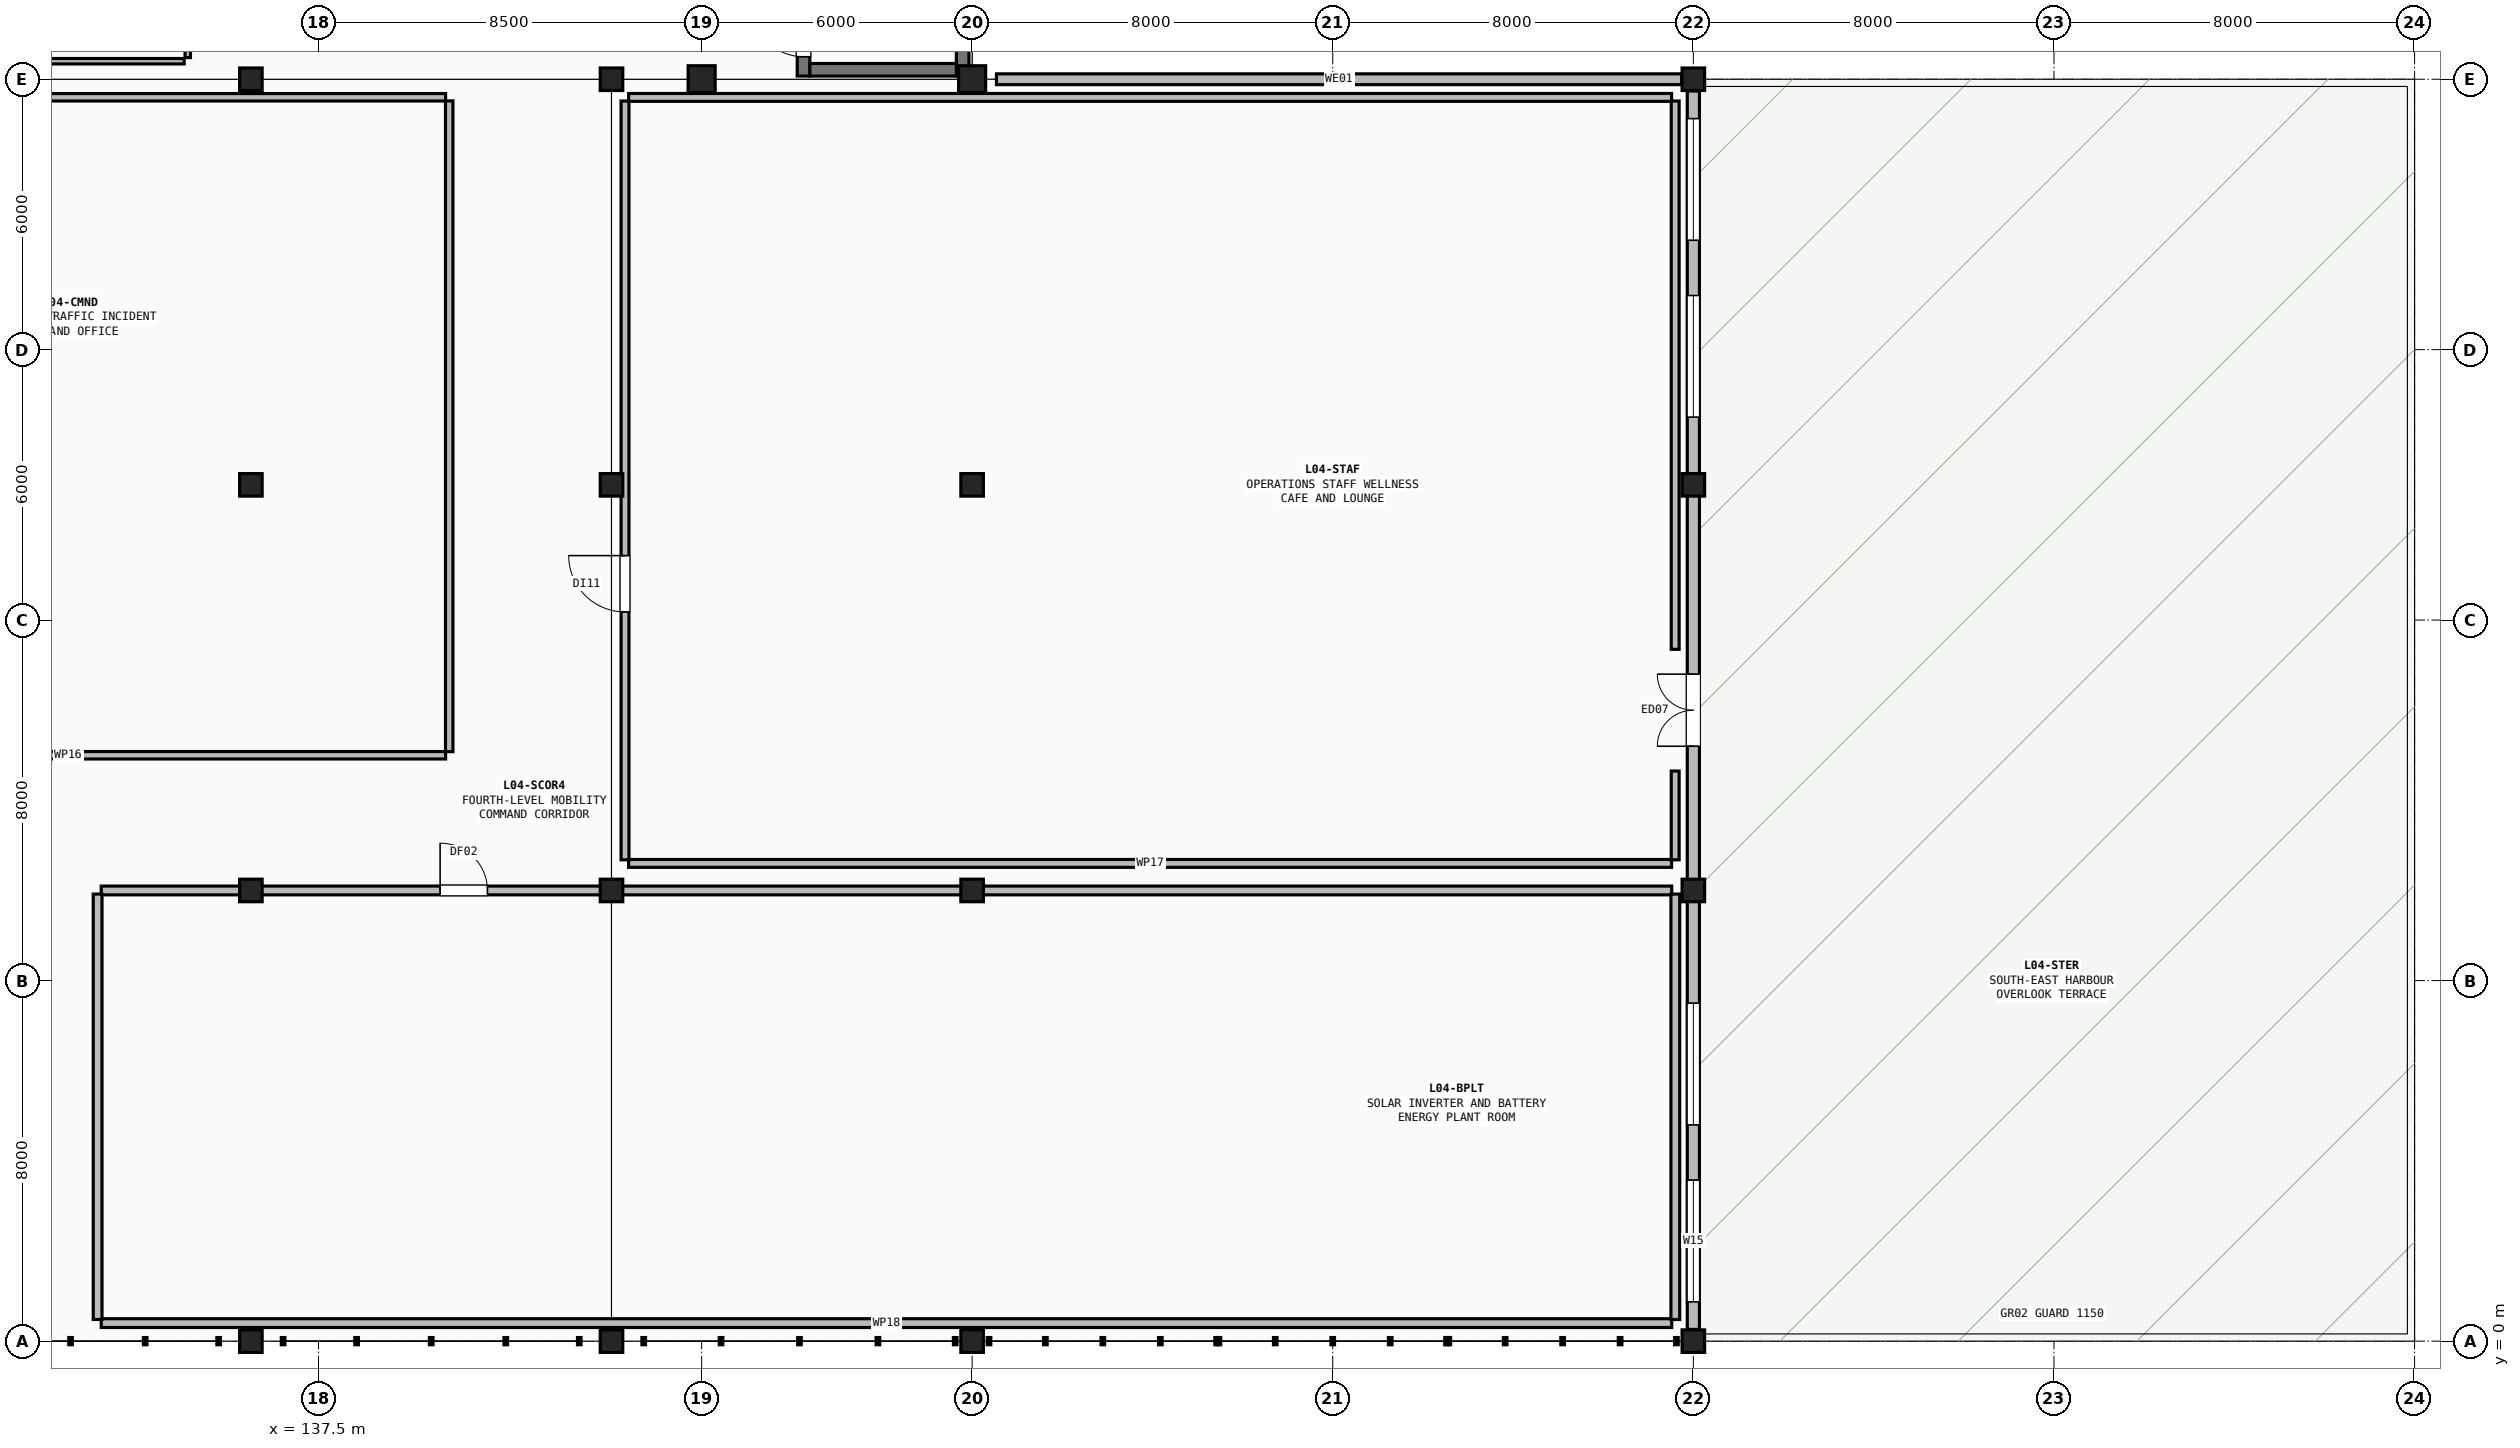
"""IFC4 building model, lengths in metres.
Left out: names, types, materials, properties, quantities, classifications, styles, units other than length and angle.
Written with IfcOpenShell. Run it as: python <this file> out.ifc"""

import sys

from ifc_helpers import new_model, si_unit, direction, frame, frame_2d, origin, origin_2d, place, context, subcontext, project, spatial, rectangle, extrude, element, fill, save


model = new_model("IFC4")
c1 = context("Model", 3, precision=1e-05, world=origin(), true_north=direction((0.0, 1.0)))
c2 = subcontext(c1, "Body", "Model", "MODEL_VIEW")
j1 = project(units=[si_unit("LENGTHUNIT", "METRE"), si_unit("PLANEANGLEUNIT", "RADIAN")], contexts=[c1])
p1 = place(None, origin())
s1 = spatial("IfcSite", under=j1, at=p1, CompositionType="ELEMENT")
p2 = place(p1, origin())
s2 = spatial("IfcBuilding", under=s1, at=p2, CompositionType="ELEMENT")
p3 = place(p2, frame((0.0, 0.0, 15.6)))
s3 = spatial("IfcBuildingStorey", under=s2, at=p3, CompositionType="ELEMENT", Elevation=15.6)
for number, where, z_axis, x_axis in (
    (1, (146.0, 28.0, 0.0), (0.0, 0.0, 1.0), (1.0, 0.0, 0.0)),
    (2, (152.0, 28.0, 0.0), (0.0, 0.0, 1.0), (1.0, 0.0, 0.0)),
):
    element("IfcColumn", number, at=place(p3, frame(where, z_axis=z_axis, x_axis=x_axis)), inside=s3, PredefinedType="COLUMN", context=c2, shape_type="SweptSolid", body=[
        extrude(rectangle(XDim=0.6, YDim=0.6, at=origin_2d()), origin(), (0.0, 0.0, 1.0), 3.6),
    ])
for number, where, z_axis, x_axis in (
    (3, (136.0, 0.0, 0.0), (0.0, 0.0, 1.0), (1.0, 0.0, 0.0)),
    (4, (136.0, 10.0, 0.0), (0.0, 0.0, 1.0), (1.0, 0.0, 0.0)),
    (5, (136.0, 19.0, 0.0), (0.0, 0.0, 1.0), (1.0, 0.0, 0.0)),
    (6, (136.0, 28.0, 0.0), (0.0, 0.0, 1.0), (1.0, 0.0, 0.0)),
    (7, (144.0, 0.0, 0.0), (0.0, 0.0, 1.0), (1.0, 0.0, 0.0)),
    (8, (144.0, 10.0, 0.0), (0.0, 0.0, 1.0), (1.0, 0.0, 0.0)),
    (9, (144.0, 19.0, 0.0), (0.0, 0.0, 1.0), (1.0, 0.0, 0.0)),
    (10, (144.0, 28.0, 0.0), (0.0, 0.0, 1.0), (1.0, 0.0, 0.0)),
    (11, (152.0, 0.0, 0.0), (0.0, 0.0, 1.0), (1.0, 0.0, 0.0)),
    (12, (152.0, 10.0, 0.0), (0.0, 0.0, 1.0), (1.0, 0.0, 0.0)),
    (13, (152.0, 19.0, 0.0), (0.0, 0.0, 1.0), (1.0, 0.0, 0.0)),
    (14, (168.0, 0.0, 0.0), (0.0, 0.0, 1.0), (1.0, 0.0, 0.0)),
    (15, (168.0, 10.0, 0.0), (0.0, 0.0, 1.0), (1.0, 0.0, 0.0)),
    (16, (168.0, 19.0, 0.0), (0.0, 0.0, 1.0), (1.0, 0.0, 0.0)),
    (17, (168.0, 28.0, 0.0), (0.0, 0.0, 1.0), (1.0, 0.0, 0.0)),
):
    element("IfcColumn", number, at=place(p3, frame(where, z_axis=z_axis, x_axis=x_axis)), inside=s3, PredefinedType="COLUMN", context=c2, shape_type="SweptSolid", body=[
        extrude(rectangle(XDim=0.5, YDim=0.5, at=origin_2d()), origin(), (0.0, 0.0, 1.0), 3.6),
    ])
p4 = place(p3, frame((168.0, 0.26, 0.0), z_axis=(0.0, 0.0, 1.0), x_axis=(0.0, 1.0, 0.0)))
e18 = element("IfcWall", 18, at=p4, inside=s3, PredefinedType="SOLIDWALL", context=c2, shape_type="SweptSolid", body=[
    extrude(rectangle(XDim=27.48, YDim=0.27, at=frame_2d((13.74, 0.0))), origin(), (0.0, 0.0, 1.0), 2.495),
])
p5 = place(p4, frame((12.94, 0.0, 0.0)))
e19 = element("IfcOpeningElement", 19, at=p5, cuts=e18, PredefinedType="OPENING", context=c2, shape_type="SweptSolid", body=[
    extrude(rectangle(XDim=1.6, YDim=2.1, at=frame_2d((0.8, 1.05))), frame((0.0, 0.145, 0.0), z_axis=(0.0, -1.0, 0.0), x_axis=(1.0, 0.0, 0.0)), (0.0, 0.0, 1.0), 0.29),
])
p6 = place(p4, frame((0.613, 0.0, 0.495)))
e20 = element("IfcOpeningElement", 20, at=p6, cuts=e18, PredefinedType="OPENING", context=c2, shape_type="SweptSolid", body=[
    extrude(rectangle(XDim=2.7, YDim=1.8, at=frame_2d((1.35, 0.9))), frame((0.0, 0.145, 0.0), z_axis=(0.0, -1.0, 0.0), x_axis=(1.0, 0.0, 0.0)), (0.0, 0.0, 1.0), 0.29),
])
p7 = place(p4, frame((4.539, 0.0, 0.495)))
e21 = element("IfcOpeningElement", 21, at=p7, cuts=e18, PredefinedType="OPENING", context=c2, shape_type="SweptSolid", body=[
    extrude(rectangle(XDim=2.7, YDim=1.8, at=frame_2d((1.35, 0.9))), frame((0.0, 0.145, 0.0), z_axis=(0.0, -1.0, 0.0), x_axis=(1.0, 0.0, 0.0)), (0.0, 0.0, 1.0), 0.29),
])
p8 = place(p4, frame((20.241, 0.0, 0.495)))
e22 = element("IfcOpeningElement", 22, at=p8, cuts=e18, PredefinedType="OPENING", context=c2, shape_type="SweptSolid", body=[
    extrude(rectangle(XDim=2.7, YDim=1.8, at=frame_2d((1.35, 0.9))), frame((0.0, 0.145, 0.0), z_axis=(0.0, -1.0, 0.0), x_axis=(1.0, 0.0, 0.0)), (0.0, 0.0, 1.0), 0.29),
])
p9 = place(p4, frame((24.167, 0.0, 0.495)))
e23 = element("IfcOpeningElement", 23, at=p9, cuts=e18, PredefinedType="OPENING", context=c2, shape_type="SweptSolid", body=[
    extrude(rectangle(XDim=2.7, YDim=1.8, at=frame_2d((1.35, 0.9))), frame((0.0, 0.145, 0.0), z_axis=(0.0, -1.0, 0.0), x_axis=(1.0, 0.0, 0.0)), (0.0, 0.0, 1.0), 0.29),
])
p10 = place(p3, frame((167.74, 28.0, 1.2), z_axis=(0.0, 0.0, 1.0), x_axis=(-1.0, 0.0, 0.0)))
e24 = element("IfcWall", 24, at=p10, inside=s3, PredefinedType="SOLIDWALL", context=c2, shape_type="SweptSolid", body=[
    extrude(rectangle(XDim=15.2, YDim=0.24, at=frame_2d((7.6, 0.0))), origin(), (0.0, 0.0, 1.0), 1.295),
])
p11 = place(p3, frame((148.26, 28.07, 0.0), z_axis=(0.0, 0.0, 1.0), x_axis=(0.0, 1.0, 0.0)))
e25 = element("IfcWall", 25, at=p11, inside=s3, PredefinedType="SHEAR", context=c2, shape_type="SweptSolid", body=[
    extrude(rectangle(XDim=9.86, YDim=0.28, at=frame_2d((4.93, 0.0))), origin(), (0.0, 0.0, 1.0), 3.6),
])
p12 = place(p11, frame((0.43, 0.0, 0.0)))
e26 = element("IfcOpeningElement", 26, at=p12, cuts=e25, PredefinedType="OPENING", context=c2, shape_type="SweptSolid", body=[
    extrude(rectangle(XDim=1.15, YDim=2.15, at=frame_2d((0.575, 1.075))), frame((0.0, 0.15, 0.0), z_axis=(0.0, -1.0, 0.0), x_axis=(1.0, 0.0, 0.0)), (0.0, 0.0, 1.0), 0.3),
])
p13 = place(p3, frame((151.79, 37.93, 0.0), z_axis=(0.0, 0.0, 1.0), x_axis=(0.0, -1.0, 0.0)))
e27 = element("IfcWall", 27, at=p13, inside=s3, PredefinedType="SHEAR", context=c2, shape_type="SweptSolid", body=[
    extrude(rectangle(XDim=9.86, YDim=0.28, at=frame_2d((4.93, 0.0))), origin(), (0.0, 0.0, 1.0), 3.6),
])
p14 = place(p3, frame((151.65, 28.21, 0.0), z_axis=(0.0, 0.0, 1.0), x_axis=(-1.0, 0.0, 0.0)))
e28 = element("IfcWall", 28, at=p14, inside=s3, PredefinedType="SHEAR", context=c2, shape_type="SweptSolid", body=[
    extrude(rectangle(XDim=3.25, YDim=0.28, at=frame_2d((1.625, 0.0))), origin(), (0.0, 0.0, 1.0), 3.6),
])
p15 = place(p3, frame((112.48, 28.4, 0.0), z_axis=(0.0, 0.0, 1.0), x_axis=(1.0, 0.0, 0.0)))
e29 = element("IfcWall", 29, at=p15, inside=s3, PredefinedType="PARTITIONING", context=c2, shape_type="SweptSolid", body=[
    extrude(rectangle(XDim=22.04, YDim=0.12, at=frame_2d((11.02, 0.0))), origin(), (0.0, 0.0, 1.0), 2.495),
])
p16 = place(p3, frame((134.6, 28.48, 0.0), z_axis=(0.0, 0.0, 1.0), x_axis=(0.0, 1.0, 0.0)))
e30 = element("IfcWall", 30, at=p16, inside=s3, PredefinedType="PARTITIONING", context=c2, shape_type="SweptSolid", body=[
    extrude(rectangle(XDim=9.44, YDim=0.12, at=frame_2d((4.72, 0.0))), origin(), (0.0, 0.0, 1.0), 3.345),
])
p17 = place(p16, frame((3.995, 0.0, 0.0)))
e31 = element("IfcOpeningElement", 31, at=p17, cuts=e30, PredefinedType="OPENING", context=c2, shape_type="SweptSolid", body=[
    extrude(rectangle(XDim=1.45, YDim=2.2, at=frame_2d((0.725, 1.1))), frame((0.0, 0.07, 0.0), z_axis=(0.0, -1.0, 0.0), x_axis=(1.0, 0.0, 0.0)), (0.0, 0.0, 1.0), 0.14),
])
p18 = place(p3, frame((112.48, 13.0, 0.0), z_axis=(0.0, 0.0, 1.0), x_axis=(1.0, 0.0, 0.0)))
e32 = element("IfcWall", 32, at=p18, inside=s3, PredefinedType="PARTITIONING", context=c2, shape_type="SweptSolid", body=[
    extrude(rectangle(XDim=27.84, YDim=0.165, at=frame_2d((13.92, 0.0))), origin(), (0.0, 0.0, 1.0), 2.595),
])
p19 = place(p18, frame((15.079, 0.0, 0.0)))
e33 = element("IfcOpeningElement", 33, at=p19, cuts=e32, PredefinedType="OPENING", context=c2, shape_type="SweptSolid", body=[
    extrude(rectangle(XDim=1.8, YDim=2.15, at=frame_2d((0.9, 1.075))), frame((0.0, 0.093, 0.0), z_axis=(0.0, -1.0, 0.0), x_axis=(1.0, 0.0, 0.0)), (0.0, 0.0, 1.0), 0.185),
])
p20 = place(p3, frame((112.48, 27.6, 0.0), z_axis=(0.0, 0.0, 1.0), x_axis=(1.0, 0.0, 0.0)))
e34 = element("IfcWall", 34, at=p20, inside=s3, PredefinedType="PARTITIONING", context=c2, shape_type="SweptSolid", body=[
    extrude(rectangle(XDim=27.84, YDim=0.165, at=frame_2d((13.92, 0.0))), origin(), (0.0, 0.0, 1.0), 2.495),
])
p21 = place(p3, frame((140.4, 13.08, 0.0), z_axis=(0.0, 0.0, 1.0), x_axis=(0.0, 1.0, 0.0)))
e35 = element("IfcWall", 35, at=p21, inside=s3, PredefinedType="PARTITIONING", context=c2, shape_type="SweptSolid", body=[
    extrude(rectangle(XDim=14.44, YDim=0.165, at=frame_2d((7.22, 0.0))), origin(), (0.0, 0.0, 1.0), 2.795),
])
p22 = place(p3, frame((144.38, 10.6, 0.0), z_axis=(0.0, 0.0, 1.0), x_axis=(1.0, 0.0, 0.0)))
e36 = element("IfcWall", 36, at=p22, inside=s3, PredefinedType="PARTITIONING", context=c2, shape_type="SweptSolid", body=[
    extrude(rectangle(XDim=23.137, YDim=0.175, at=frame_2d((11.569, 0.0))), origin(), (0.0, 0.0, 1.0), 2.595),
])
p23 = place(p3, frame((144.38, 27.597, 0.0), z_axis=(0.0, 0.0, 1.0), x_axis=(1.0, 0.0, 0.0)))
e37 = element("IfcWall", 37, at=p23, inside=s3, PredefinedType="PARTITIONING", context=c2, shape_type="SweptSolid", body=[
    extrude(rectangle(XDim=23.137, YDim=0.175, at=frame_2d((11.569, 0.0))), origin(), (0.0, 0.0, 1.0), 2.495),
])
p24 = place(p3, frame((144.3, 10.68, 0.0), z_axis=(0.0, 0.0, 1.0), x_axis=(0.0, 1.0, 0.0)))
e38 = element("IfcWall", 38, at=p24, inside=s3, PredefinedType="PARTITIONING", context=c2, shape_type="SweptSolid", body=[
    extrude(rectangle(XDim=16.837, YDim=0.175, at=frame_2d((8.418, 0.0))), origin(), (0.0, 0.0, 1.0), 2.345),
])
p25 = place(p24, frame((5.5, 0.0, 0.0)))
e39 = element("IfcOpeningElement", 39, at=p25, cuts=e38, PredefinedType="OPENING", context=c2, shape_type="SweptSolid", body=[
    extrude(rectangle(XDim=1.25, YDim=2.1, at=frame_2d((0.625, 1.05))), frame((0.0, 0.098, 0.0), z_axis=(0.0, -1.0, 0.0), x_axis=(1.0, 0.0, 0.0)), (0.0, 0.0, 1.0), 0.195),
])
p26 = place(p3, frame((167.597, 10.68, 0.0), z_axis=(0.0, 0.0, 1.0), x_axis=(0.0, 1.0, 0.0)))
e40 = element("IfcWall", 40, at=p26, inside=s3, PredefinedType="PARTITIONING", context=c2, shape_type="SweptSolid", body=[
    extrude(rectangle(XDim=1.97, YDim=0.175, at=frame_2d((0.985, 0.0))), origin(), (0.0, 0.0, 1.0), 3.345),
])
p27 = place(p3, frame((167.597, 15.35, 0.0), z_axis=(0.0, 0.0, 1.0), x_axis=(0.0, 1.0, 0.0)))
e41 = element("IfcWall", 41, at=p27, inside=s3, PredefinedType="PARTITIONING", context=c2, shape_type="SweptSolid", body=[
    extrude(rectangle(XDim=12.167, YDim=0.175, at=frame_2d((6.083, 0.0))), origin(), (0.0, 0.0, 1.0), 2.495),
])
p28 = place(p3, frame((132.68, 0.4, 0.0), z_axis=(0.0, 0.0, 1.0), x_axis=(1.0, 0.0, 0.0)))
e42 = element("IfcWall", 42, at=p28, inside=s3, PredefinedType="PARTITIONING", context=c2, shape_type="SweptSolid", body=[
    extrude(rectangle(XDim=34.84, YDim=0.195, at=frame_2d((17.42, 0.0))), origin(), (0.0, 0.0, 1.0), 2.595),
])
p29 = place(p3, frame((132.68, 10.0, 0.0), z_axis=(0.0, 0.0, 1.0), x_axis=(1.0, 0.0, 0.0)))
e43 = element("IfcWall", 43, at=p29, inside=s3, PredefinedType="PARTITIONING", context=c2, shape_type="SweptSolid", body=[
    extrude(rectangle(XDim=34.84, YDim=0.195, at=frame_2d((17.42, 0.0))), origin(), (0.0, 0.0, 1.0), 2.345),
])
p30 = place(p29, frame((7.518, 0.0, 0.0)))
e44 = element("IfcOpeningElement", 44, at=p30, cuts=e43, PredefinedType="OPENING", context=c2, shape_type="SweptSolid", body=[
    extrude(rectangle(XDim=1.05, YDim=2.15, at=frame_2d((0.525, 1.075))), frame((0.0, 0.107, 0.0), z_axis=(0.0, -1.0, 0.0), x_axis=(1.0, 0.0, 0.0)), (0.0, 0.0, 1.0), 0.215),
])
p31 = place(p3, frame((132.6, 0.48, 0.0), z_axis=(0.0, 0.0, 1.0), x_axis=(0.0, 1.0, 0.0)))
e45 = element("IfcWall", 45, at=p31, inside=s3, PredefinedType="PARTITIONING", context=c2, shape_type="SweptSolid", body=[
    extrude(rectangle(XDim=9.44, YDim=0.195, at=frame_2d((4.72, 0.0))), origin(), (0.0, 0.0, 1.0), 2.695),
])
p32 = place(p3, frame((167.6, 0.48, 0.0), z_axis=(0.0, 0.0, 1.0), x_axis=(0.0, 1.0, 0.0)))
e46 = element("IfcWall", 46, at=p32, inside=s3, PredefinedType="PARTITIONING", context=c2, shape_type="SweptSolid", body=[
    extrude(rectangle(XDim=9.44, YDim=0.195, at=frame_2d((4.72, 0.0))), origin(), (0.0, 0.0, 1.0), 2.495),
])
p33 = place(p5, origin())
e47 = element("IfcDoor", 47, at=p33, inside=s3, OperationType="DOUBLE_DOOR_SINGLE_SWING", PredefinedType="DOOR", context=c2, shape_type="SweptSolid", body=[
    extrude(rectangle(XDim=1.6, YDim=2.1, at=frame_2d((0.8, 1.05))), frame((0.0, 0.025, 0.0), z_axis=(0.0, -1.0, 0.0), x_axis=(1.0, 0.0, 0.0)), (0.0, 0.0, 1.0), 0.05),
])
fill(e19, e47)
p34 = place(p6, origin())
e48 = element("IfcWindow", 48, at=p34, inside=s3, PartitioningType="SINGLE_PANEL", PredefinedType="WINDOW", context=c2, shape_type="SweptSolid", body=[
    extrude(rectangle(XDim=2.7, YDim=1.8, at=frame_2d((1.35, 0.9))), frame((0.0, 0.03, 0.0), z_axis=(0.0, -1.0, 0.0), x_axis=(1.0, 0.0, 0.0)), (0.0, 0.0, 1.0), 0.06),
])
fill(e20, e48)
p35 = place(p7, origin())
e49 = element("IfcWindow", 49, at=p35, inside=s3, PartitioningType="SINGLE_PANEL", PredefinedType="WINDOW", context=c2, shape_type="SweptSolid", body=[
    extrude(rectangle(XDim=2.7, YDim=1.8, at=frame_2d((1.35, 0.9))), frame((0.0, 0.03, 0.0), z_axis=(0.0, -1.0, 0.0), x_axis=(1.0, 0.0, 0.0)), (0.0, 0.0, 1.0), 0.06),
])
fill(e21, e49)
p36 = place(p8, origin())
e50 = element("IfcWindow", 50, at=p36, inside=s3, PartitioningType="SINGLE_PANEL", PredefinedType="WINDOW", context=c2, shape_type="SweptSolid", body=[
    extrude(rectangle(XDim=2.7, YDim=1.8, at=frame_2d((1.35, 0.9))), frame((0.0, 0.03, 0.0), z_axis=(0.0, -1.0, 0.0), x_axis=(1.0, 0.0, 0.0)), (0.0, 0.0, 1.0), 0.06),
])
fill(e22, e50)
p37 = place(p9, origin())
e51 = element("IfcWindow", 51, at=p37, inside=s3, PartitioningType="SINGLE_PANEL", PredefinedType="WINDOW", context=c2, shape_type="SweptSolid", body=[
    extrude(rectangle(XDim=2.7, YDim=1.8, at=frame_2d((1.35, 0.9))), frame((0.0, 0.03, 0.0), z_axis=(0.0, -1.0, 0.0), x_axis=(1.0, 0.0, 0.0)), (0.0, 0.0, 1.0), 0.06),
])
fill(e23, e51)
p38 = place(p12, origin())
e52 = element("IfcDoor", 52, at=p38, inside=s3, OperationType="SINGLE_SWING_RIGHT", PredefinedType="DOOR", context=c2, shape_type="SweptSolid", body=[
    extrude(rectangle(XDim=1.15, YDim=2.15, at=frame_2d((0.575, 1.075))), frame((0.0, 0.025, 0.0), z_axis=(0.0, -1.0, 0.0), x_axis=(1.0, 0.0, 0.0)), (0.0, 0.0, 1.0), 0.05),
])
fill(e26, e52)
p39 = place(p25, origin())
e53 = element("IfcDoor", 53, at=p39, inside=s3, OperationType="SINGLE_SWING_RIGHT", PredefinedType="DOOR", context=c2, shape_type="SweptSolid", body=[
    extrude(rectangle(XDim=1.25, YDim=2.1, at=frame_2d((0.625, 1.05))), frame((0.0, 0.025, 0.0), z_axis=(0.0, -1.0, 0.0), x_axis=(1.0, 0.0, 0.0)), (0.0, 0.0, 1.0), 0.05),
])
fill(e39, e53)
p40 = place(p30, origin())
e54 = element("IfcDoor", 54, at=p40, inside=s3, OperationType="SINGLE_SWING_LEFT", PredefinedType="DOOR", context=c2, shape_type="SweptSolid", body=[
    extrude(rectangle(XDim=1.05, YDim=2.15, at=frame_2d((0.525, 1.075))), frame((0.0, 0.025, 0.0), z_axis=(0.0, -1.0, 0.0), x_axis=(1.0, 0.0, 0.0)), (0.0, 0.0, 1.0), 0.05),
])
fill(e44, e54)
save(model, sys.argv[1])
